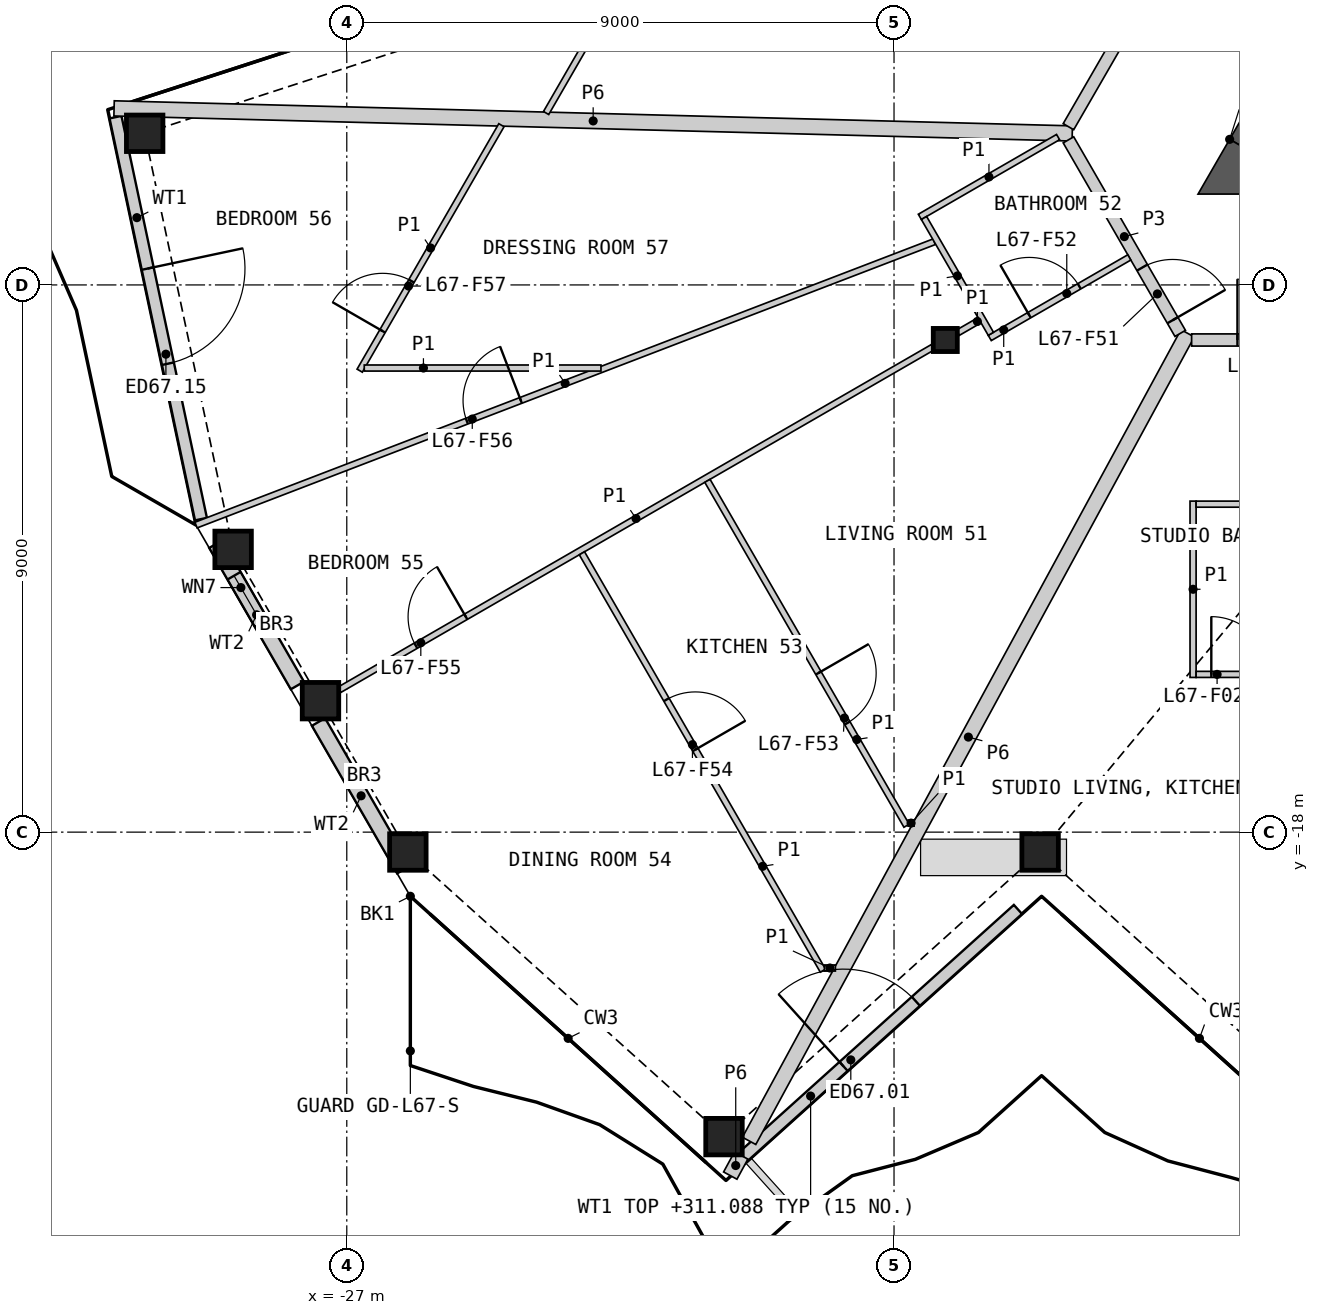
"""IFC4 building model, lengths in metres.
Left out: names, types, materials, properties, quantities, classifications, styles, units other than length and angle.
Written with IfcOpenShell. Run it as: python <this file> out.ifc"""

import sys

from ifc_helpers import new_model, si_unit, direction, frame, frame_2d, origin, origin_2d, place, context, subcontext, project, spatial, polyline, rectangle, hollow_rectangle, i_section, outline, extrude, element, fill, save


model = new_model("IFC4")
c1 = context("Model", 3, precision=1e-05, world=origin(), true_north=direction((0.0, 1.0)))
c2 = subcontext(c1, "Body", "Model", "MODEL_VIEW")
j1 = project(units=[si_unit("LENGTHUNIT", "METRE"), si_unit("PLANEANGLEUNIT", "RADIAN")], contexts=[c1])
p1 = place(None, origin())
s1 = spatial("IfcSite", under=j1, at=p1, CompositionType="ELEMENT")
p2 = place(p1, origin())
s2 = spatial("IfcBuilding", under=s1, at=p2, CompositionType="ELEMENT")
p3 = place(p2, frame((0.0, 0.0, 308.6)))
s3 = spatial("IfcBuildingStorey", under=s2, at=p3, CompositionType="ELEMENT", Elevation=308.6)
for number, where, z_axis, x_axis in (
    (1, (-25.995, -18.327, 0.0), (0.0, 0.0, 1.0), (1.0, 0.0, 0.0)),
    (2, (-20.796, -23.008, 0.0), (0.0, 0.0, 1.0), (1.0, 0.0, 0.0)),
    (3, (-15.597, -18.327, 0.0), (0.0, 0.0, 1.0), (1.0, 0.0, 0.0)),
    (4, (-30.324, -6.506, 0.0), (0.0, 0.0, 1.0), (1.0, 0.0, 0.0)),
    (5, (-28.869, -13.349, 0.0), (0.0, 0.0, 1.0), (1.0, 0.0, 0.0)),
    (6, (-27.432, -15.838, 0.0), (0.0, 0.0, 1.0), (1.0, 0.0, 0.0)),
):
    element("IfcColumn", number, at=place(p3, frame(where, z_axis=z_axis, x_axis=x_axis)), inside=s3, PredefinedType="COLUMN", context=c2, shape_type="SweptSolid", body=[
        extrude(hollow_rectangle(XDim=0.6, YDim=0.6, WallThickness=0.04, at=origin_2d()), origin(), (0.0, 0.0, 1.0), 3.4),
    ])
p4 = place(p3, frame((-17.157, -9.906, 0.0), z_axis=(0.0, 0.0, 1.0), x_axis=(1.0, 0.0, 0.0)))
e7 = element("IfcColumn", 7, at=p4, inside=s3, PredefinedType="COLUMN", context=c2, shape_type="SweptSolid", body=[
    extrude(i_section(OverallWidth=0.396, OverallDepth=0.381, WebThickness=0.019, FlangeThickness=0.03, at=origin_2d()), origin(), (0.0, 0.0, 1.0), 3.4),
])
p5 = place(p3, frame((-20.508, -23.364, 0.0), z_axis=(0.0, 0.0, 1.0), x_axis=(0.743135364919, 0.669141113224, 0.0)))
e8 = element("IfcWall", 8, at=p5, inside=s3, PredefinedType="SOLIDWALL", context=c2, shape_type="SweptSolid", body=[
    extrude(rectangle(XDim=6.117, YDim=0.2, at=frame_2d((3.059, 0.0))), origin(), (0.0, 0.0, 1.0), 2.488),
])
p6 = place(p5, frame((2.259, 0.0, 0.0)))
e9 = element("IfcOpeningElement", 9, at=p6, cuts=e8, PredefinedType="OPENING", context=c2, shape_type="SweptSolid", body=[
    extrude(rectangle(XDim=1.6, YDim=2.25, at=frame_2d((0.8, 1.125))), frame((0.0, 0.11, 0.0), z_axis=(0.0, -1.0, 0.0), x_axis=(1.0, 0.0, 0.0)), (0.0, 0.0, 1.0), 0.22),
])
p7 = place(p3, frame((-30.803, -6.241, 0.0), z_axis=(0.0, 0.0, 1.0), x_axis=(0.207917941651, -0.978146272057, 0.0)))
e10 = element("IfcWall", 10, at=p7, inside=s3, PredefinedType="SOLIDWALL", context=c2, shape_type="SweptSolid", body=[
    extrude(rectangle(XDim=6.759, YDim=0.2, at=frame_2d((3.379, 0.0))), origin(), (0.0, 0.0, 1.0), 2.488),
])
p8 = place(p7, frame((2.545, 0.0, 0.0)))
e11 = element("IfcOpeningElement", 11, at=p8, cuts=e10, PredefinedType="OPENING", context=c2, shape_type="SweptSolid", body=[
    extrude(rectangle(XDim=1.6, YDim=2.25, at=frame_2d((0.8, 1.125))), frame((0.0, 0.11, 0.0), z_axis=(0.0, -1.0, 0.0), x_axis=(1.0, 0.0, 0.0)), (0.0, 0.0, 1.0), 0.22),
])
p9 = place(p3, frame((-29.154, -13.263, 0.0), z_axis=(0.0, 0.0, 1.0), x_axis=(0.500032109083, -0.866006864803, 0.0)))
e12 = element("IfcWall", 12, at=p9, inside=s3, PredefinedType="SOLIDWALL", context=c2, shape_type="SweptSolid", body=[
    extrude(rectangle(XDim=2.684, YDim=0.25, at=frame_2d((1.342, 0.0))), origin(), (0.0, 0.0, 1.0), 2.488),
])
p10 = place(p9, frame((0.6, 0.0, 0.4)))
e13 = element("IfcOpeningElement", 13, at=p10, cuts=e12, PredefinedType="OPENING", context=c2, shape_type="SweptSolid", body=[
    extrude(rectangle(XDim=0.9, YDim=0.6, at=frame_2d((0.45, 0.3))), frame((0.0, 0.135, 0.0), z_axis=(0.0, -1.0, 0.0), x_axis=(1.0, 0.0, 0.0)), (0.0, 0.0, 1.0), 0.27),
])
p11 = place(p3, frame((-27.466, -16.188, 0.0), z_axis=(0.0, 0.0, 1.0), x_axis=(0.499968627931, -0.866043515699, 0.0)))
e14 = element("IfcWall", 14, at=p11, inside=s3, PredefinedType="SOLIDWALL", context=c2, shape_type="SweptSolid", body=[
    extrude(rectangle(XDim=2.804, YDim=0.25, at=frame_2d((1.402, 0.0))), origin(), (0.0, 0.0, 1.0), 2.488),
])
p12 = place(p3, frame((-9.562, -2.15, 0.0), z_axis=(0.0, 0.0, 1.0), x_axis=(-0.500015214976, -0.866016619236, 0.0)))
e15 = element("IfcWall", 15, at=p12, inside=s3, PredefinedType="SHEAR", context=c2, shape_type="SweptSolid", body=[
    extrude(rectangle(XDim=5.318, YDim=0.6, at=frame_2d((2.659, 0.0))), origin(), (0.0, 0.0, 1.0), 3.1),
])
p13 = place(p3, origin())
e16 = element("IfcWall", 16, at=p13, inside=s3, PredefinedType="SHEAR", context=c2, shape_type="SweptSolid", body=[
    extrude(outline(polyline([(-12.48, -6.606), (-11.961, -6.906), (-11.961, -7.506), (-13.0, -7.506), (-12.48, -6.606)])), origin(), (0.0, 0.0, 1.0), 3.1),
])
p14 = place(p3, frame((-30.827, -6.096, 0.0), z_axis=(0.0, 0.0, 1.0), x_axis=(0.999657799118, -0.026158835273, 0.0)))
e17 = element("IfcWall", 17, at=p14, inside=s3, PredefinedType="PARTITIONING", context=c2, shape_type="SweptSolid", body=[
    extrude(rectangle(XDim=15.763, YDim=0.25, at=frame_2d((7.882, 0.0))), origin(), (0.0, 0.0, 1.0), 2.33),
])
p15 = place(p3, frame((-20.383, -23.078, 0.0), z_axis=(0.0, 0.0, 1.0), x_axis=(0.477177412766, 0.878806984921, 0.0)))
e18 = element("IfcWall", 18, at=p15, inside=s3, PredefinedType="PARTITIONING", context=c2, shape_type="SweptSolid", body=[
    extrude(rectangle(XDim=15.114, YDim=0.25, at=frame_2d((7.557, 0.0))), origin(), (0.0, 0.0, 1.0), 2.33),
])
p16 = place(p3, frame((-13.106, -9.906, 0.0), z_axis=(0.0, 0.0, 1.0), x_axis=(1.0, 0.0, 0.0)))
e19 = element("IfcWall", 19, at=p16, inside=s3, PredefinedType="PARTITIONING", context=c2, shape_type="SweptSolid", body=[
    extrude(rectangle(XDim=4.32, YDim=0.2, at=frame_2d((2.16, 0.0))), origin(), (0.0, 0.0, 1.0), 3.1),
])
p17 = place(p16, frame((0.753, 0.0, 0.0)))
e20 = element("IfcOpeningElement", 20, at=p17, cuts=e19, PredefinedType="OPENING", context=c2, shape_type="SweptSolid", body=[
    extrude(rectangle(XDim=1.0, YDim=2.1, at=frame_2d((0.5, 1.05))), frame((0.0, 0.11, 0.0), z_axis=(0.0, -1.0, 0.0), x_axis=(1.0, 0.0, 0.0)), (0.0, 0.0, 1.0), 0.22),
])
p18 = place(p3, frame((-15.131, -6.397, 0.0), z_axis=(0.0, 0.0, 1.0), x_axis=(0.500003406062, 0.866023437285, 0.0)))
e21 = element("IfcWall", 21, at=p18, inside=s3, PredefinedType="PARTITIONING", context=c2, shape_type="SweptSolid", body=[
    extrude(rectangle(XDim=4.288, YDim=0.2, at=frame_2d((2.144, 0.0))), origin(), (0.0, 0.0, 1.0), 3.1),
])
p19 = place(p3, frame((-15.131, -6.614, 0.0), z_axis=(0.0, 0.0, 1.0), x_axis=(0.499967746641, -0.866044024469, 0.0)))
e22 = element("IfcWall", 22, at=p19, inside=s3, PredefinedType="PARTITIONING", context=c2, shape_type="SweptSolid", body=[
    extrude(rectangle(XDim=3.676, YDim=0.2, at=frame_2d((1.838, 0.0))), origin(), (0.0, 0.0, 1.0), 3.1),
])
p20 = place(p19, frame((2.426, 0.0, 0.0)))
e23 = element("IfcOpeningElement", 23, at=p20, cuts=e22, PredefinedType="OPENING", context=c2, shape_type="SweptSolid", body=[
    extrude(rectangle(XDim=1.0, YDim=2.1, at=frame_2d((0.5, 1.05))), frame((0.0, 0.11, 0.0), z_axis=(0.0, -1.0, 0.0), x_axis=(1.0, 0.0, 0.0)), (0.0, 0.0, 1.0), 0.22),
])
p21 = place(p3, frame((-20.693, -23.649, 0.0), z_axis=(0.0, 0.0, 1.0), x_axis=(0.477077538769, 0.878861207474, 0.0)))
e24 = element("IfcWall", 24, at=p21, inside=s3, PredefinedType="PARTITIONING", context=c2, shape_type="SweptSolid", body=[
    extrude(rectangle(XDim=0.376, YDim=0.25, at=frame_2d((0.188, 0.0))), origin(), (0.0, 0.0, 1.0), 2.33),
])
p22 = place(p3, frame((-29.479, -12.95, 0.0), z_axis=(0.0, 0.0, 1.0), x_axis=(0.933581523131, 0.358365092703, 0.0)))
e25 = element("IfcWall", 25, at=p22, inside=s3, PredefinedType="PARTITIONING", context=c2, shape_type="SweptSolid", body=[
    extrude(rectangle(XDim=13.005, YDim=0.1, at=frame_2d((6.502, 0.0))), origin(), (0.0, 0.0, 1.0), 2.33),
])
p23 = place(p22, frame((4.771, 0.0, 0.0)))
e26 = element("IfcOpeningElement", 26, at=p23, cuts=e25, PredefinedType="OPENING", context=c2, shape_type="SweptSolid", body=[
    extrude(rectangle(XDim=0.95, YDim=2.1, at=frame_2d((0.475, 1.05))), frame((0.0, 0.06, 0.0), z_axis=(0.0, -1.0, 0.0), x_axis=(1.0, 0.0, 0.0)), (0.0, 0.0, 1.0), 0.12),
])
p24 = place(p3, frame((-27.122, -15.659, 0.0), z_axis=(0.0, 0.0, 1.0), x_axis=(0.866021046153, 0.500007547564, 0.0)))
e27 = element("IfcWall", 27, at=p24, inside=s3, PredefinedType="PARTITIONING", context=c2, shape_type="SweptSolid", body=[
    extrude(rectangle(XDim=11.267, YDim=0.1, at=frame_2d((5.634, 0.0))), origin(), (0.0, 0.0, 1.0), 2.33),
])
p25 = place(p24, frame((1.452, 0.0, 0.0)))
e28 = element("IfcOpeningElement", 28, at=p25, cuts=e27, PredefinedType="OPENING", context=c2, shape_type="SweptSolid", body=[
    extrude(rectangle(XDim=0.95, YDim=2.1, at=frame_2d((0.475, 1.05))), frame((0.0, 0.06, 0.0), z_axis=(0.0, -1.0, 0.0), x_axis=(1.0, 0.0, 0.0)), (0.0, 0.0, 1.0), 0.12),
])
p26 = place(p3, frame((-23.133, -13.414, 0.0), z_axis=(0.0, 0.0, 1.0), x_axis=(0.500014841469, -0.866016834889, 0.0)))
e29 = element("IfcWall", 29, at=p26, inside=s3, PredefinedType="PARTITIONING", context=c2, shape_type="SweptSolid", body=[
    extrude(rectangle(XDim=7.927, YDim=0.1, at=frame_2d((3.963, 0.0))), origin(), (0.0, 0.0, 1.0), 2.33),
])
p27 = place(p26, frame((2.78, 0.0, 0.0)))
e30 = element("IfcOpeningElement", 30, at=p27, cuts=e29, PredefinedType="OPENING", context=c2, shape_type="SweptSolid", body=[
    extrude(rectangle(XDim=0.95, YDim=2.1, at=frame_2d((0.475, 1.05))), frame((0.0, 0.06, 0.0), z_axis=(0.0, -1.0, 0.0), x_axis=(1.0, 0.0, 0.0)), (0.0, 0.0, 1.0), 0.12),
])
p28 = place(p3, frame((-23.722, -6.172, 0.0), z_axis=(0.0, 0.0, 1.0), x_axis=(0.499991774685, 0.86603015262, 0.0)))
e31 = element("IfcWall", 31, at=p28, inside=s3, PredefinedType="PARTITIONING", context=c2, shape_type="SweptSolid", body=[
    extrude(rectangle(XDim=6.774, YDim=0.1, at=frame_2d((3.387, 0.0))), origin(), (0.0, 0.0, 1.0), 2.33),
])
p29 = place(p28, frame((3.364, 0.0, 0.0)))
e32 = element("IfcOpeningElement", 32, at=p29, cuts=e31, PredefinedType="OPENING", context=c2, shape_type="SweptSolid", body=[
    extrude(rectangle(XDim=0.95, YDim=2.1, at=frame_2d((0.475, 1.05))), frame((0.0, 0.06, 0.0), z_axis=(0.0, -1.0, 0.0), x_axis=(1.0, 0.0, 0.0)), (0.0, 0.0, 1.0), 0.12),
])
p30 = place(p3, frame((-21.069, -12.222, 0.0), z_axis=(0.0, 0.0, 1.0), x_axis=(0.499991310556, -0.866030420579, 0.0)))
e33 = element("IfcWall", 33, at=p30, inside=s3, PredefinedType="PARTITIONING", context=c2, shape_type="SweptSolid", body=[
    extrude(rectangle(XDim=6.55, YDim=0.1, at=frame_2d((3.275, 0.0))), origin(), (0.0, 0.0, 1.0), 2.33),
])
p31 = place(p30, frame((3.65, 0.0, 0.0)))
e34 = element("IfcOpeningElement", 34, at=p31, cuts=e33, PredefinedType="OPENING", context=c2, shape_type="SweptSolid", body=[
    extrude(rectangle(XDim=0.95, YDim=2.1, at=frame_2d((0.475, 1.05))), frame((0.0, 0.06, 0.0), z_axis=(0.0, -1.0, 0.0), x_axis=(1.0, 0.0, 0.0)), (0.0, 0.0, 1.0), 0.12),
])
p32 = place(p3, frame((-26.788, -10.41, 0.0), z_axis=(0.0, 0.0, 1.0), x_axis=(0.499997484116, 0.866026856326, 0.0)))
e35 = element("IfcWall", 35, at=p32, inside=s3, PredefinedType="PARTITIONING", context=c2, shape_type="SweptSolid", body=[
    extrude(rectangle(XDim=4.662, YDim=0.1, at=frame_2d((2.331, 0.0))), origin(), (0.0, 0.0, 1.0), 2.33),
])
p33 = place(p32, frame((0.752, 0.0, 0.0)))
e36 = element("IfcOpeningElement", 36, at=p33, cuts=e35, PredefinedType="OPENING", context=c2, shape_type="SweptSolid", body=[
    extrude(rectangle(XDim=0.95, YDim=2.1, at=frame_2d((0.475, 1.05))), frame((0.0, 0.06, 0.0), z_axis=(0.0, -1.0, 0.0), x_axis=(1.0, 0.0, 0.0)), (0.0, 0.0, 1.0), 0.12),
])
p34 = place(p3, frame((-26.712, -10.367, 0.0), z_axis=(0.0, 0.0, 1.0), x_axis=(1.0, 0.0, 0.0)))
e37 = element("IfcWall", 37, at=p34, inside=s3, PredefinedType="PARTITIONING", context=c2, shape_type="SweptSolid", body=[
    extrude(rectangle(XDim=3.893, YDim=0.1, at=frame_2d((1.946, 0.0))), origin(), (0.0, 0.0, 1.0), 2.33),
])
p35 = place(p3, frame((-13.082, -15.456, 0.0), z_axis=(0.0, 0.0, 1.0), x_axis=(0.0, 1.0, 0.0)))
e38 = element("IfcWall", 38, at=p35, inside=s3, PredefinedType="PARTITIONING", context=c2, shape_type="SweptSolid", body=[
    extrude(rectangle(XDim=2.9, YDim=0.1, at=frame_2d((1.45, 0.0))), origin(), (0.0, 0.0, 1.0), 2.33),
])
p36 = place(p3, frame((-16.426, -9.872, 0.0), z_axis=(0.0, 0.0, 1.0), x_axis=(0.866029095148, 0.499993606316, 0.0)))
e39 = element("IfcWall", 39, at=p36, inside=s3, PredefinedType="PARTITIONING", context=c2, shape_type="SweptSolid", body=[
    extrude(rectangle(XDim=2.65, YDim=0.1, at=frame_2d((1.325, 0.0))), origin(), (0.0, 0.0, 1.0), 2.33),
])
p37 = place(p36, frame((0.75, 0.0, 0.0)))
e40 = element("IfcOpeningElement", 40, at=p37, cuts=e39, PredefinedType="OPENING", context=c2, shape_type="SweptSolid", body=[
    extrude(rectangle(XDim=0.95, YDim=2.1, at=frame_2d((0.475, 1.05))), frame((0.0, 0.06, 0.0), z_axis=(0.0, -1.0, 0.0), x_axis=(1.0, 0.0, 0.0)), (0.0, 0.0, 1.0), 0.12),
])
p38 = place(p3, frame((-13.032, -12.606, 0.0), z_axis=(0.0, 0.0, 1.0), x_axis=(1.0, 0.0, 0.0)))
e41 = element("IfcWall", 41, at=p38, inside=s3, PredefinedType="PARTITIONING", context=c2, shape_type="SweptSolid", body=[
    extrude(rectangle(XDim=2.525, YDim=0.1, at=frame_2d((1.263, 0.0))), origin(), (0.0, 0.0, 1.0), 2.33),
])
p39 = place(p3, frame((-13.032, -15.406, 0.0), z_axis=(0.0, 0.0, 1.0), x_axis=(1.0, 0.0, 0.0)))
e42 = element("IfcWall", 42, at=p39, inside=s3, PredefinedType="PARTITIONING", context=c2, shape_type="SweptSolid", body=[
    extrude(rectangle(XDim=2.525, YDim=0.1, at=frame_2d((1.263, 0.0))), origin(), (0.0, 0.0, 1.0), 2.33),
])
p40 = place(p39, frame((0.25, 0.0, 0.0)))
e43 = element("IfcOpeningElement", 43, at=p40, cuts=e42, PredefinedType="OPENING", context=c2, shape_type="SweptSolid", body=[
    extrude(rectangle(XDim=0.95, YDim=2.1, at=frame_2d((0.475, 1.05))), frame((0.0, 0.06, 0.0), z_axis=(0.0, -1.0, 0.0), x_axis=(1.0, 0.0, 0.0)), (0.0, 0.0, 1.0), 0.12),
])
p41 = place(p3, frame((-17.575, -7.881, 0.0), z_axis=(0.0, 0.0, 1.0), x_axis=(0.866013657776, 0.500020344131, 0.0)))
e44 = element("IfcWall", 44, at=p41, inside=s3, PredefinedType="PARTITIONING", context=c2, shape_type="SweptSolid", body=[
    extrude(rectangle(XDim=2.625, YDim=0.1, at=frame_2d((1.312, 0.0))), origin(), (0.0, 0.0, 1.0), 2.33),
])
p42 = place(p3, frame((-17.507, -7.899, 0.0), z_axis=(0.0, 0.0, 1.0), x_axis=(0.499946605688, -0.86605622881, 0.0)))
e45 = element("IfcWall", 45, at=p42, inside=s3, PredefinedType="PARTITIONING", context=c2, shape_type="SweptSolid", body=[
    extrude(rectangle(XDim=2.2, YDim=0.1, at=frame_2d((1.1, 0.0))), origin(), (0.0, 0.0, 1.0), 2.33),
])
p43 = place(p3, frame((-16.949, -9.786, 0.0), z_axis=(0.0, 0.0, 1.0), x_axis=(0.866036909293, 0.499980071345, 0.0)))
e46 = element("IfcWall", 46, at=p43, inside=s3, PredefinedType="PARTITIONING", context=c2, shape_type="SweptSolid", body=[
    extrude(rectangle(XDim=0.41, YDim=0.1, at=frame_2d((0.205, 0.0))), origin(), (0.0, 0.0, 1.0), 2.33),
])
p44 = place(p3, frame((-19.145, -20.235, 0.0), z_axis=(0.0, 0.0, 1.0), x_axis=(1.0, 0.0, 0.0)))
e47 = element("IfcWall", 47, at=p44, inside=s3, PredefinedType="PARTITIONING", context=c2, shape_type="SweptSolid", body=[
    extrude(rectangle(XDim=0.18, YDim=0.1, at=frame_2d((0.09, 0.0))), origin(), (0.0, 0.0, 1.0), 2.33),
])
p45 = place(p3, frame((-17.769, -17.852, 0.0), z_axis=(0.0, 0.0, 1.0), x_axis=(1.0, 0.0, 0.0)))
e48 = element("IfcWall", 48, at=p45, inside=s3, PredefinedType="PARTITIONING", context=c2, shape_type="SweptSolid", body=[
    extrude(rectangle(XDim=0.098, YDim=0.1, at=frame_2d((0.049, 0.0))), origin(), (0.0, 0.0, 1.0), 2.33),
])
p46 = place(p6, origin())
e49 = element("IfcDoor", 49, at=p46, inside=s3, OperationType="DOUBLE_DOOR_SINGLE_SWING", PredefinedType="DOOR", context=c2, shape_type="SweptSolid", body=[
    extrude(rectangle(XDim=1.6, YDim=2.25, at=frame_2d((0.8, 1.125))), frame((0.0, 0.025, 0.0), z_axis=(0.0, -1.0, 0.0), x_axis=(1.0, 0.0, 0.0)), (0.0, 0.0, 1.0), 0.05),
])
fill(e9, e49)
p47 = place(p8, origin())
e50 = element("IfcDoor", 50, at=p47, inside=s3, OperationType="DOUBLE_DOOR_SINGLE_SWING", PredefinedType="DOOR", context=c2, shape_type="SweptSolid", body=[
    extrude(rectangle(XDim=1.6, YDim=2.25, at=frame_2d((0.8, 1.125))), frame((0.0, 0.025, 0.0), z_axis=(0.0, -1.0, 0.0), x_axis=(1.0, 0.0, 0.0)), (0.0, 0.0, 1.0), 0.05),
])
fill(e11, e50)
p48 = place(p10, origin())
e51 = element("IfcWindow", 51, at=p48, inside=s3, PartitioningType="SINGLE_PANEL", PredefinedType="WINDOW", context=c2, shape_type="SweptSolid", body=[
    extrude(rectangle(XDim=0.9, YDim=0.6, at=frame_2d((0.45, 0.3))), frame((0.0, 0.03, 0.0), z_axis=(0.0, -1.0, 0.0), x_axis=(1.0, 0.0, 0.0)), (0.0, 0.0, 1.0), 0.06),
])
fill(e13, e51)
p49 = place(p17, origin())
e52 = element("IfcDoor", 52, at=p49, inside=s3, OperationType="SINGLE_SWING_LEFT", PredefinedType="DOOR", context=c2, shape_type="SweptSolid", body=[
    extrude(rectangle(XDim=1.0, YDim=2.1, at=frame_2d((0.5, 1.05))), frame((0.0, 0.025, 0.0), z_axis=(0.0, -1.0, 0.0), x_axis=(1.0, 0.0, 0.0)), (0.0, 0.0, 1.0), 0.05),
])
fill(e20, e52)
p50 = place(p40, origin())
e53 = element("IfcDoor", 53, at=p50, inside=s3, OperationType="SINGLE_SWING_LEFT", PredefinedType="DOOR", context=c2, shape_type="SweptSolid", body=[
    extrude(rectangle(XDim=0.95, YDim=2.1, at=frame_2d((0.475, 1.05))), frame((0.0, 0.025, 0.0), z_axis=(0.0, -1.0, 0.0), x_axis=(1.0, 0.0, 0.0)), (0.0, 0.0, 1.0), 0.05),
])
fill(e43, e53)
p51 = place(p20, origin())
e54 = element("IfcDoor", 54, at=p51, inside=s3, OperationType="SINGLE_SWING_RIGHT", PredefinedType="DOOR", context=c2, shape_type="SweptSolid", body=[
    extrude(rectangle(XDim=1.0, YDim=2.1, at=frame_2d((0.5, 1.05))), frame((0.0, 0.025, 0.0), z_axis=(0.0, -1.0, 0.0), x_axis=(1.0, 0.0, 0.0)), (0.0, 0.0, 1.0), 0.05),
])
fill(e23, e54)
p52 = place(p37, origin())
e55 = element("IfcDoor", 55, at=p52, inside=s3, OperationType="SINGLE_SWING_LEFT", PredefinedType="DOOR", context=c2, shape_type="SweptSolid", body=[
    extrude(rectangle(XDim=0.95, YDim=2.1, at=frame_2d((0.475, 1.05))), frame((0.0, 0.025, 0.0), z_axis=(0.0, -1.0, 0.0), x_axis=(1.0, 0.0, 0.0)), (0.0, 0.0, 1.0), 0.05),
])
fill(e40, e55)
p53 = place(p31, origin())
e56 = element("IfcDoor", 56, at=p53, inside=s3, OperationType="SINGLE_SWING_LEFT", PredefinedType="DOOR", context=c2, shape_type="SweptSolid", body=[
    extrude(rectangle(XDim=0.95, YDim=2.1, at=frame_2d((0.475, 1.05))), frame((0.0, 0.025, 0.0), z_axis=(0.0, -1.0, 0.0), x_axis=(1.0, 0.0, 0.0)), (0.0, 0.0, 1.0), 0.05),
])
fill(e34, e56)
p54 = place(p27, origin())
e57 = element("IfcDoor", 57, at=p54, inside=s3, OperationType="SINGLE_SWING_RIGHT", PredefinedType="DOOR", context=c2, shape_type="SweptSolid", body=[
    extrude(rectangle(XDim=0.95, YDim=2.1, at=frame_2d((0.475, 1.05))), frame((0.0, 0.025, 0.0), z_axis=(0.0, -1.0, 0.0), x_axis=(1.0, 0.0, 0.0)), (0.0, 0.0, 1.0), 0.05),
])
fill(e30, e57)
p55 = place(p25, origin())
e58 = element("IfcDoor", 58, at=p55, inside=s3, OperationType="SINGLE_SWING_RIGHT", PredefinedType="DOOR", context=c2, shape_type="SweptSolid", body=[
    extrude(rectangle(XDim=0.95, YDim=2.1, at=frame_2d((0.475, 1.05))), frame((0.0, 0.025, 0.0), z_axis=(0.0, -1.0, 0.0), x_axis=(1.0, 0.0, 0.0)), (0.0, 0.0, 1.0), 0.05),
])
fill(e28, e58)
p56 = place(p23, origin())
e59 = element("IfcDoor", 59, at=p56, inside=s3, OperationType="SINGLE_SWING_RIGHT", PredefinedType="DOOR", context=c2, shape_type="SweptSolid", body=[
    extrude(rectangle(XDim=0.95, YDim=2.1, at=frame_2d((0.475, 1.05))), frame((0.0, 0.025, 0.0), z_axis=(0.0, -1.0, 0.0), x_axis=(1.0, 0.0, 0.0)), (0.0, 0.0, 1.0), 0.05),
])
fill(e26, e59)
p57 = place(p33, origin())
e60 = element("IfcDoor", 60, at=p57, inside=s3, OperationType="SINGLE_SWING_LEFT", PredefinedType="DOOR", context=c2, shape_type="SweptSolid", body=[
    extrude(rectangle(XDim=0.95, YDim=2.1, at=frame_2d((0.475, 1.05))), frame((0.0, 0.025, 0.0), z_axis=(0.0, -1.0, 0.0), x_axis=(1.0, 0.0, 0.0)), (0.0, 0.0, 1.0), 0.05),
])
fill(e36, e60)
save(model, sys.argv[1])
